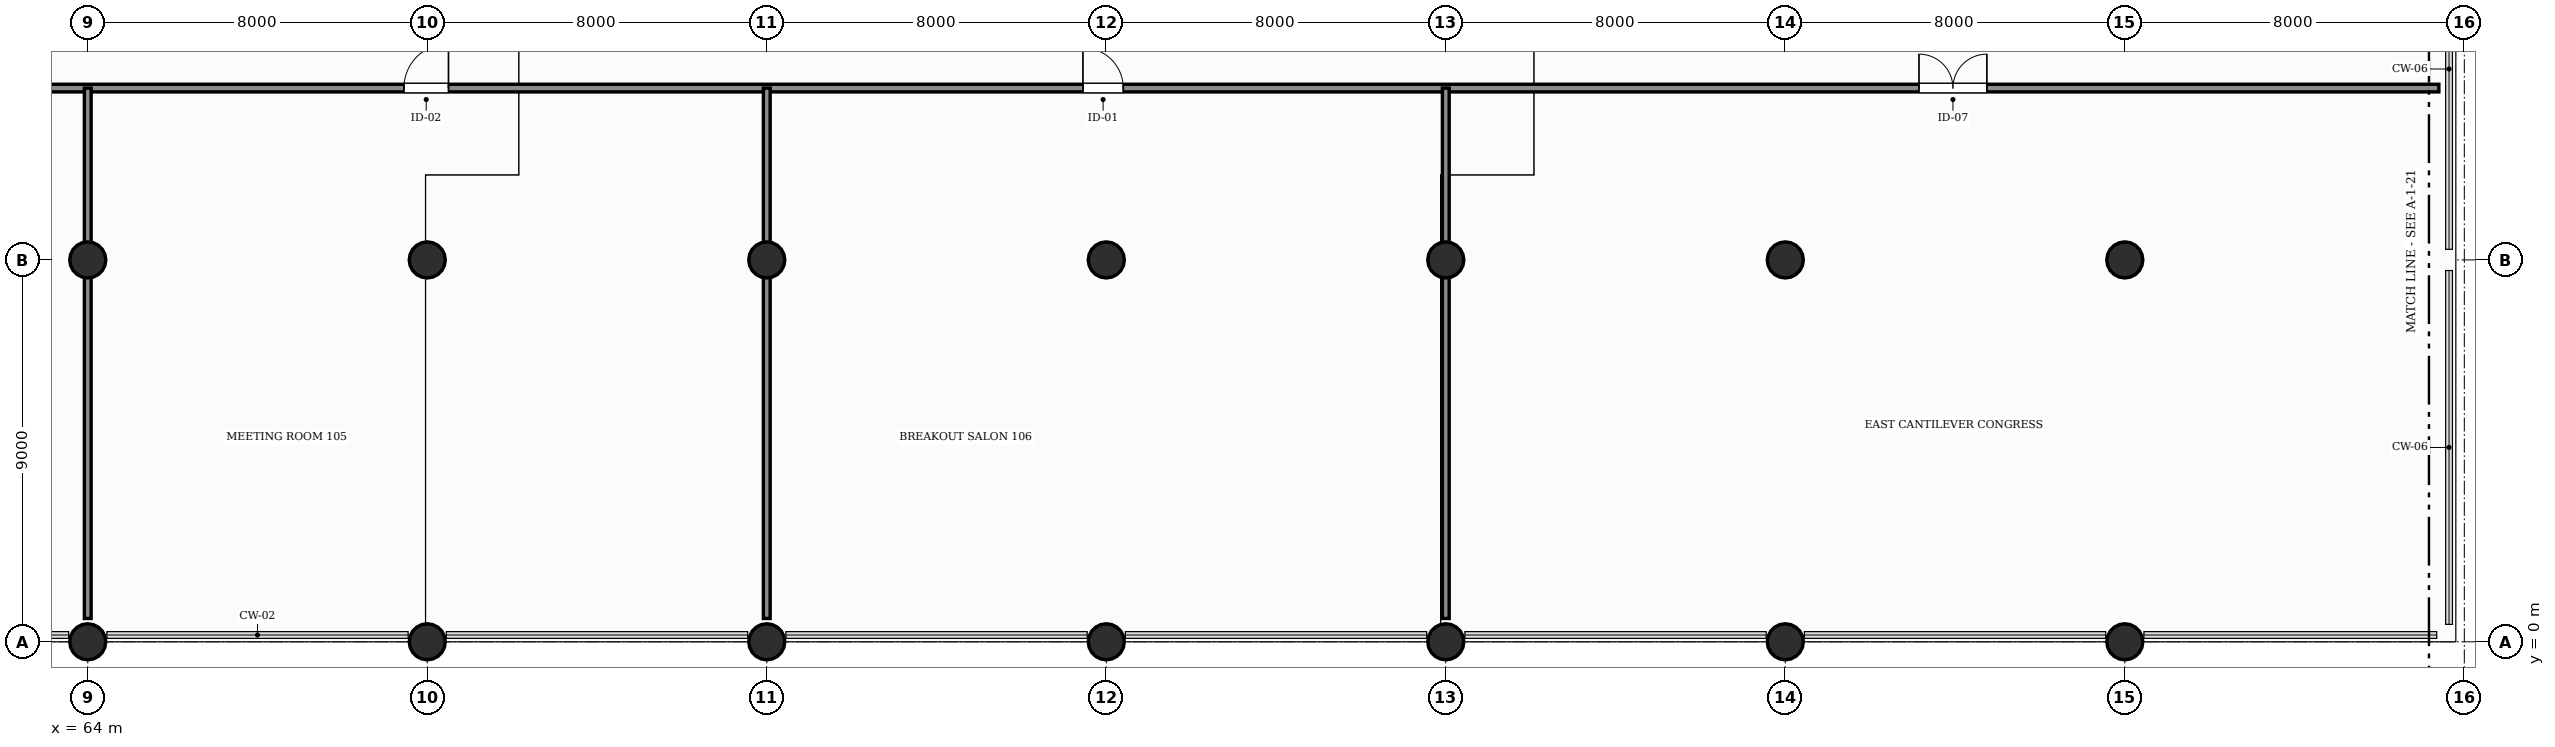
"""IFC4 building model, lengths in metres.
Left out: names, types, materials, properties, quantities, classifications, styles, units other than length and angle.
Written with IfcOpenShell. Run it as: python <this file> out.ifc"""

import sys

from ifc_helpers import new_model, si_unit, direction, frame, frame_2d, origin, origin_2d, place, context, subcontext, project, spatial, rectangle, circle, extrude, element, fill, save


model = new_model("IFC4")
c1 = context("Model", 3, precision=1e-05, world=origin(), true_north=direction((0.0, 1.0)))
c2 = subcontext(c1, "Body", "Model", "MODEL_VIEW")
j1 = project(units=[si_unit("LENGTHUNIT", "METRE"), si_unit("PLANEANGLEUNIT", "RADIAN")], contexts=[c1])
p1 = place(None, origin())
s1 = spatial("IfcSite", under=j1, at=p1, CompositionType="ELEMENT")
p2 = place(p1, origin())
s2 = spatial("IfcBuilding", under=s1, at=p2, CompositionType="ELEMENT")
p3 = place(p2, frame((0.0, 0.0, 6.0)))
s3 = spatial("IfcBuildingStorey", under=s2, at=p3, CompositionType="ELEMENT", Elevation=6.0)
for number, where, z_axis, x_axis in (
    (1, (64.0, 0.0, 0.0), (0.0, 0.0, 1.0), (1.0, 0.0, 0.0)),
    (2, (64.0, 9.0, 0.0), (0.0, 0.0, 1.0), (1.0, 0.0, 0.0)),
    (3, (72.0, 0.0, 0.0), (0.0, 0.0, 1.0), (1.0, 0.0, 0.0)),
    (4, (72.0, 9.0, 0.0), (0.0, 0.0, 1.0), (1.0, 0.0, 0.0)),
    (5, (80.0, 0.0, 0.0), (0.0, 0.0, 1.0), (1.0, 0.0, 0.0)),
    (6, (80.0, 9.0, 0.0), (0.0, 0.0, 1.0), (1.0, 0.0, 0.0)),
    (7, (88.0, 0.0, 0.0), (0.0, 0.0, 1.0), (1.0, 0.0, 0.0)),
    (8, (88.0, 9.0, 0.0), (0.0, 0.0, 1.0), (1.0, 0.0, 0.0)),
    (9, (96.0, 0.0, 0.0), (0.0, 0.0, 1.0), (1.0, 0.0, 0.0)),
    (10, (96.0, 9.0, 0.0), (0.0, 0.0, 1.0), (1.0, 0.0, 0.0)),
    (11, (104.0, 0.0, 0.0), (0.0, 0.0, 1.0), (1.0, 0.0, 0.0)),
    (12, (104.0, 9.0, 0.0), (0.0, 0.0, 1.0), (1.0, 0.0, 0.0)),
    (13, (112.0, 0.0, 0.0), (0.0, 0.0, 1.0), (1.0, 0.0, 0.0)),
    (14, (112.0, 9.0, 0.0), (0.0, 0.0, 1.0), (1.0, 0.0, 0.0)),
):
    element("IfcColumn", number, at=place(p3, frame(where, z_axis=z_axis, x_axis=x_axis)), inside=s3, PredefinedType="COLUMN", context=c2, shape_type="SweptSolid", body=[
        extrude(circle(Radius=0.425, at=origin_2d()), origin(), (0.0, 0.0, 1.0), 5.4),
    ])
p4 = place(p3, frame((0.6, 13.05, 0.0), z_axis=(0.0, 0.0, 1.0), x_axis=(1.0, 0.0, 0.0)))
e15 = element("IfcWall", 15, at=p4, inside=s3, PredefinedType="PARTITIONING", context=c2, shape_type="SweptSolid", body=[
    extrude(rectangle(XDim=118.8, YDim=0.18, at=frame_2d((59.4, 0.0))), origin(), (0.0, 0.0, 1.0), 3.85),
])
p5 = place(p4, frame((7.15, 0.0, 0.0)))
e16 = element("IfcOpeningElement", 16, at=p5, cuts=e15, PredefinedType="OPENING", context=c2, shape_type="SweptSolid", body=[
    extrude(rectangle(XDim=1.05, YDim=2.25, at=frame_2d((0.525, 1.125))), frame((0.0, 0.1, 0.0), z_axis=(0.0, -1.0, 0.0), x_axis=(1.0, 0.0, 0.0)), (0.0, 0.0, 1.0), 0.2),
])
p6 = place(p4, frame((22.85, 0.0, 0.0)))
e17 = element("IfcOpeningElement", 17, at=p6, cuts=e15, PredefinedType="OPENING", context=c2, shape_type="SweptSolid", body=[
    extrude(rectangle(XDim=0.95, YDim=2.2, at=frame_2d((0.475, 1.1))), frame((0.0, 0.1, 0.0), z_axis=(0.0, -1.0, 0.0), x_axis=(1.0, 0.0, 0.0)), (0.0, 0.0, 1.0), 0.2),
])
p7 = place(p4, frame((38.85, 0.0, 0.0)))
e18 = element("IfcOpeningElement", 18, at=p7, cuts=e15, PredefinedType="OPENING", context=c2, shape_type="SweptSolid", body=[
    extrude(rectangle(XDim=1.05, YDim=2.25, at=frame_2d((0.525, 1.125))), frame((0.0, 0.1, 0.0), z_axis=(0.0, -1.0, 0.0), x_axis=(1.0, 0.0, 0.0)), (0.0, 0.0, 1.0), 0.2),
])
p8 = place(p4, frame((54.85, 0.0, 0.0)))
e19 = element("IfcOpeningElement", 19, at=p8, cuts=e15, PredefinedType="OPENING", context=c2, shape_type="SweptSolid", body=[
    extrude(rectangle(XDim=0.95, YDim=2.2, at=frame_2d((0.475, 1.1))), frame((0.0, 0.1, 0.0), z_axis=(0.0, -1.0, 0.0), x_axis=(1.0, 0.0, 0.0)), (0.0, 0.0, 1.0), 0.2),
])
p9 = place(p4, frame((70.85, 0.0, 0.0)))
e20 = element("IfcOpeningElement", 20, at=p9, cuts=e15, PredefinedType="OPENING", context=c2, shape_type="SweptSolid", body=[
    extrude(rectangle(XDim=1.05, YDim=2.25, at=frame_2d((0.525, 1.125))), frame((0.0, 0.1, 0.0), z_axis=(0.0, -1.0, 0.0), x_axis=(1.0, 0.0, 0.0)), (0.0, 0.0, 1.0), 0.2),
])
p10 = place(p4, frame((86.85, 0.0, 0.0)))
e21 = element("IfcOpeningElement", 21, at=p10, cuts=e15, PredefinedType="OPENING", context=c2, shape_type="SweptSolid", body=[
    extrude(rectangle(XDim=0.95, YDim=2.2, at=frame_2d((0.475, 1.1))), frame((0.0, 0.1, 0.0), z_axis=(0.0, -1.0, 0.0), x_axis=(1.0, 0.0, 0.0)), (0.0, 0.0, 1.0), 0.2),
])
p11 = place(p4, frame((106.55, 0.0, 0.0)))
e22 = element("IfcOpeningElement", 22, at=p11, cuts=e15, PredefinedType="OPENING", context=c2, shape_type="SweptSolid", body=[
    extrude(rectangle(XDim=1.6, YDim=2.3, at=frame_2d((0.8, 1.15))), frame((0.0, 0.1, 0.0), z_axis=(0.0, -1.0, 0.0), x_axis=(1.0, 0.0, 0.0)), (0.0, 0.0, 1.0), 0.2),
])
for number, where, z_axis, x_axis in (
    (23, (64.0, 0.55, 0.0), (0.0, 0.0, 1.0), (0.0, 1.0, 0.0)),
    (24, (80.0, 0.55, 0.0), (0.0, 0.0, 1.0), (0.0, 1.0, 0.0)),
    (25, (96.0, 0.55, 0.0), (0.0, 0.0, 1.0), (0.0, 1.0, 0.0)),
):
    element("IfcWall", number, at=place(p3, frame(where, z_axis=z_axis, x_axis=x_axis)), inside=s3, PredefinedType="PARTITIONING", context=c2, shape_type="SweptSolid", body=[
        extrude(rectangle(XDim=12.5, YDim=0.16, at=frame_2d((6.25, 0.0))), origin(), (0.0, 0.0, 1.0), 3.85),
    ])
p12 = place(p9, origin())
e26 = element("IfcDoor", 26, at=p12, inside=s3, OperationType="SINGLE_SWING_RIGHT", PredefinedType="DOOR", context=c2, shape_type="SweptSolid", body=[
    extrude(rectangle(XDim=1.05, YDim=2.25, at=frame_2d((0.525, 1.125))), frame((0.0, 0.025, 0.0), z_axis=(0.0, -1.0, 0.0), x_axis=(1.0, 0.0, 0.0)), (0.0, 0.0, 1.0), 0.05),
])
fill(e20, e26)
p13 = place(p10, origin())
e27 = element("IfcDoor", 27, at=p13, inside=s3, OperationType="SINGLE_SWING_LEFT", PredefinedType="DOOR", context=c2, shape_type="SweptSolid", body=[
    extrude(rectangle(XDim=0.95, YDim=2.2, at=frame_2d((0.475, 1.1))), frame((0.0, 0.025, 0.0), z_axis=(0.0, -1.0, 0.0), x_axis=(1.0, 0.0, 0.0)), (0.0, 0.0, 1.0), 0.05),
])
fill(e21, e27)
p14 = place(p11, origin())
e28 = element("IfcDoor", 28, at=p14, inside=s3, OperationType="DOUBLE_DOOR_SINGLE_SWING", PredefinedType="DOOR", context=c2, shape_type="SweptSolid", body=[
    extrude(rectangle(XDim=1.6, YDim=2.3, at=frame_2d((0.8, 1.15))), frame((0.0, 0.025, 0.0), z_axis=(0.0, -1.0, 0.0), x_axis=(1.0, 0.0, 0.0)), (0.0, 0.0, 1.0), 0.05),
])
fill(e22, e28)
save(model, sys.argv[1])
